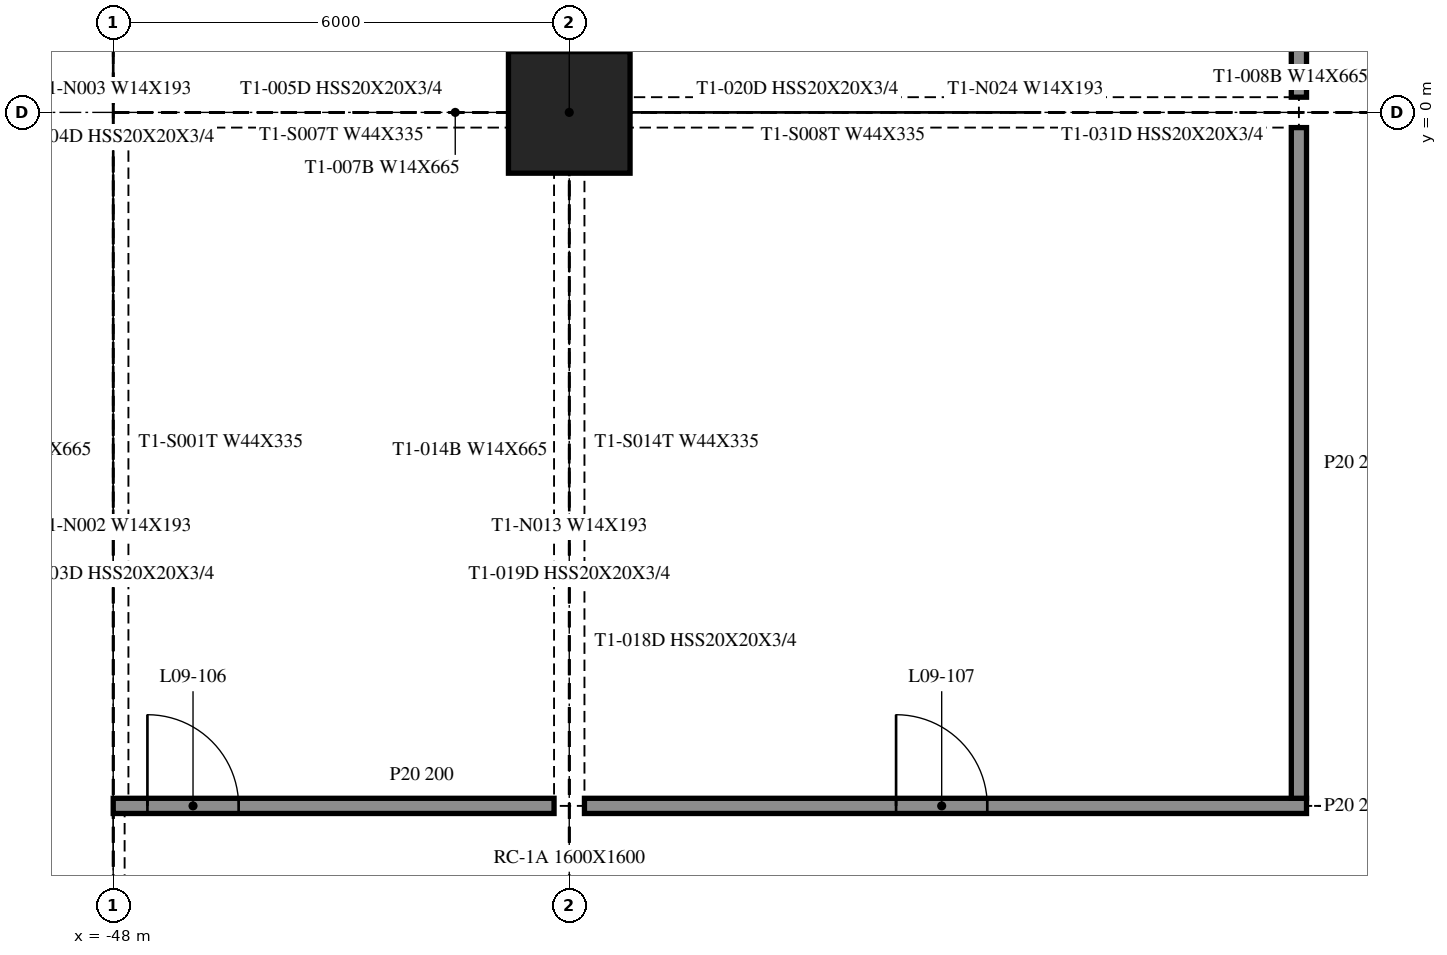
"""IFC4 building model, lengths in metres.
Left out: names, types, materials, properties, quantities, classifications, styles, units other than length and angle.
Written with IfcOpenShell. Run it as: python <this file> out.ifc"""

import sys

from ifc_helpers import new_model, si_unit, direction, frame, frame_2d, origin, origin_2d, place, context, subcontext, project, spatial, rectangle, extrude, element, fill, save


model = new_model("IFC4")
c1 = context("Model", 3, precision=1e-05, world=origin(), true_north=direction((0.0, 1.0)))
c2 = subcontext(c1, "Body", "Model", "MODEL_VIEW")
j1 = project(units=[si_unit("LENGTHUNIT", "METRE"), si_unit("PLANEANGLEUNIT", "RADIAN")], contexts=[c1])
p1 = place(None, origin())
s1 = spatial("IfcSite", under=j1, at=p1, CompositionType="ELEMENT")
p2 = place(p1, origin())
s2 = spatial("IfcBuilding", under=s1, at=p2, CompositionType="ELEMENT")
p3 = place(p2, frame((0.0, 0.0, 41.6)))
s3 = spatial("IfcBuildingStorey", under=s2, at=p3, CompositionType="ELEMENT", Elevation=41.6)
p4 = place(p3, frame((-42.0, 0.0, -0.55), z_axis=(0.0, 0.0, 1.0), x_axis=(1.0, 0.0, 0.0)))
e1 = element("IfcColumn", 1, at=p4, inside=s3, PredefinedType="COLUMN", context=c2, shape_type="SweptSolid", body=[
    extrude(rectangle(XDim=1.6, YDim=1.6, at=origin_2d()), origin(), (0.0, 0.0, 1.0), 4.61),
])
p5 = place(p3, frame((-48.0, -9.125, 0.0), z_axis=(0.0, 0.0, 1.0), x_axis=(1.0, 0.0, 0.0)))
e2 = element("IfcWall", 2, at=p5, inside=s3, PredefinedType="PARTITIONING", context=c2, shape_type="SweptSolid", body=[
    extrude(rectangle(XDim=5.8, YDim=0.2, at=frame_2d((2.9, 0.0))), origin(), (0.0, 0.0, 1.0), 4.06),
])
p6 = place(p5, frame((0.45, 0.0, 0.0)))
e3 = element("IfcOpeningElement", 3, at=p6, cuts=e2, PredefinedType="OPENING", context=c2, shape_type="SweptSolid", body=[
    extrude(rectangle(XDim=1.2, YDim=2.1, at=frame_2d((0.6, 1.05))), frame((0.0, 0.11, 0.0), z_axis=(0.0, -1.0, 0.0), x_axis=(1.0, 0.0, 0.0)), (0.0, 0.0, 1.0), 0.22),
])
p7 = place(p3, frame((-41.8, -9.125, 0.0), z_axis=(0.0, 0.0, 1.0), x_axis=(1.0, 0.0, 0.0)))
e4 = element("IfcWall", 4, at=p7, inside=s3, PredefinedType="PARTITIONING", context=c2, shape_type="SweptSolid", body=[
    extrude(rectangle(XDim=9.5, YDim=0.2, at=frame_2d((4.75, 0.0))), origin(), (0.0, 0.0, 1.0), 4.06),
])
p8 = place(p7, frame((4.1, 0.0, 0.0)))
e5 = element("IfcOpeningElement", 5, at=p8, cuts=e4, PredefinedType="OPENING", context=c2, shape_type="SweptSolid", body=[
    extrude(rectangle(XDim=1.2, YDim=2.1, at=frame_2d((0.6, 1.05))), frame((0.0, 0.11, 0.0), z_axis=(0.0, -1.0, 0.0), x_axis=(1.0, 0.0, 0.0)), (0.0, 0.0, 1.0), 0.22),
])
p9 = place(p3, frame((-32.4, -9.025, 0.0), z_axis=(0.0, 0.0, 1.0), x_axis=(0.0, 1.0, 0.0)))
e6 = element("IfcWall", 6, at=p9, inside=s3, PredefinedType="PARTITIONING", context=c2, shape_type="SweptSolid", body=[
    extrude(rectangle(XDim=8.825, YDim=0.2, at=frame_2d((4.413, 0.0))), origin(), (0.0, 0.0, 1.0), 4.06),
])
p10 = place(p3, frame((-32.4, 0.2, 0.0), z_axis=(0.0, 0.0, 1.0), x_axis=(0.0, 1.0, 0.0)))
e7 = element("IfcWall", 7, at=p10, inside=s3, PredefinedType="PARTITIONING", context=c2, shape_type="SweptSolid", body=[
    extrude(rectangle(XDim=11.1, YDim=0.2, at=frame_2d((5.55, 0.0))), origin(), (0.0, 0.0, 1.0), 4.06),
])
p11 = place(p10, frame((4.9, 0.0, 0.0)))
e8 = element("IfcOpeningElement", 8, at=p11, cuts=e7, PredefinedType="OPENING", context=c2, shape_type="SweptSolid", body=[
    extrude(rectangle(XDim=1.2, YDim=2.1, at=frame_2d((0.6, 1.05))), frame((0.0, 0.11, 0.0), z_axis=(0.0, -1.0, 0.0), x_axis=(1.0, 0.0, 0.0)), (0.0, 0.0, 1.0), 0.22),
])
p12 = place(p6, origin())
e9 = element("IfcDoor", 9, at=p12, inside=s3, OperationType="SINGLE_SWING_LEFT", PredefinedType="DOOR", context=c2, shape_type="SweptSolid", body=[
    extrude(rectangle(XDim=1.2, YDim=2.1, at=frame_2d((0.6, 1.05))), frame((0.0, 0.025, 0.0), z_axis=(0.0, -1.0, 0.0), x_axis=(1.0, 0.0, 0.0)), (0.0, 0.0, 1.0), 0.05),
])
fill(e3, e9)
p13 = place(p8, origin())
e10 = element("IfcDoor", 10, at=p13, inside=s3, OperationType="SINGLE_SWING_LEFT", PredefinedType="DOOR", context=c2, shape_type="SweptSolid", body=[
    extrude(rectangle(XDim=1.2, YDim=2.1, at=frame_2d((0.6, 1.05))), frame((0.0, 0.025, 0.0), z_axis=(0.0, -1.0, 0.0), x_axis=(1.0, 0.0, 0.0)), (0.0, 0.0, 1.0), 0.05),
])
fill(e5, e10)
save(model, sys.argv[1])
